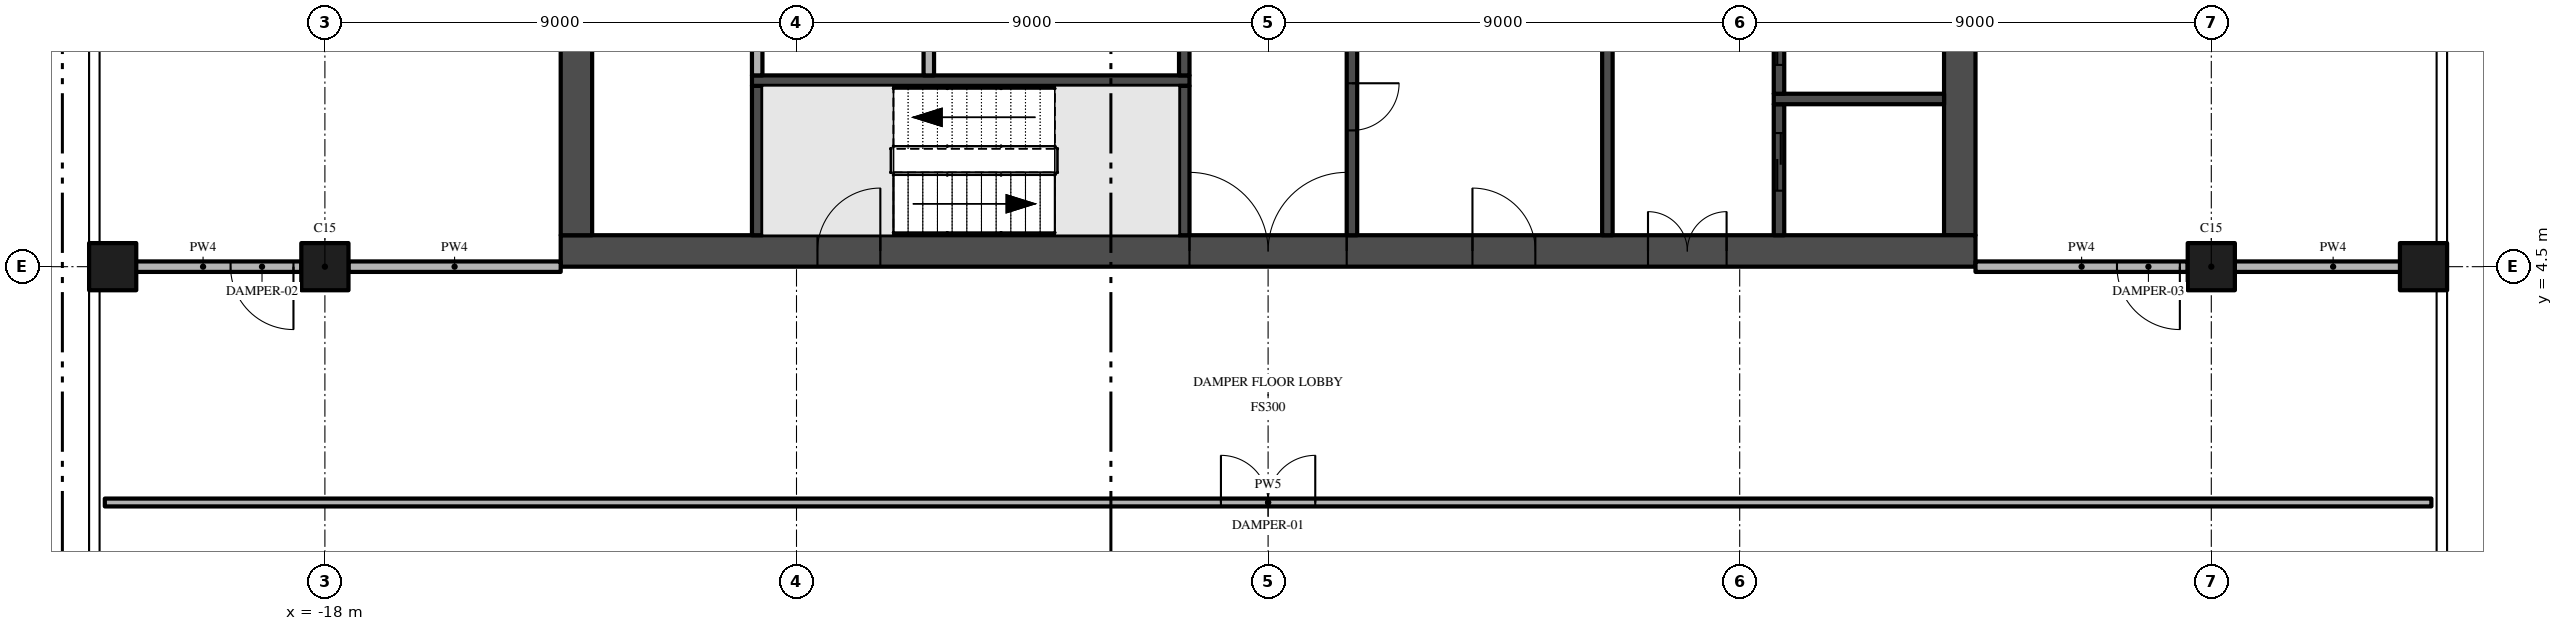
"""IFC4 building model, lengths in metres.
Left out: names, types, materials, properties, quantities, classifications, styles, units other than length and angle.
Written with IfcOpenShell. Run it as: python <this file> out.ifc"""

import sys

from ifc_helpers import new_model, si_unit, direction, frame, frame_2d, origin, origin_2d, place, context, subcontext, project, spatial, rectangle, extrude, element, fill, save


model = new_model("IFC4")
c1 = context("Model", 3, precision=1e-05, world=origin(), true_north=direction((0.0, 1.0)))
c2 = subcontext(c1, "Body", "Model", "MODEL_VIEW")
j1 = project(units=[si_unit("LENGTHUNIT", "METRE"), si_unit("PLANEANGLEUNIT", "RADIAN")], contexts=[c1])
p1 = place(None, origin())
s1 = spatial("IfcSite", under=j1, at=p1, CompositionType="ELEMENT")
p2 = place(p1, origin())
s2 = spatial("IfcBuilding", under=s1, at=p2, CompositionType="ELEMENT")
p3 = place(p2, frame((0.0, 0.0, 289.4)))
s3 = spatial("IfcBuildingStorey", under=s2, at=p3, CompositionType="ELEMENT", Elevation=289.4)
p4 = place(p3, frame((-13.5, 4.8, -0.3), z_axis=(0.0, 0.0, 1.0), x_axis=(1.0, 0.0, 0.0)))
e1 = element("IfcWall", 1, at=p4, inside=s3, PredefinedType="SHEAR", context=c2, shape_type="SweptSolid", body=[
    extrude(rectangle(XDim=27.0, YDim=0.6, at=frame_2d((13.5, 0.0))), origin(), (0.0, 0.0, 1.0), 8.0),
])
p5 = place(p4, frame((12.0, 0.0, 0.3)))
e2 = element("IfcOpeningElement", 2, at=p5, cuts=e1, PredefinedType="OPENING", context=c2, shape_type="SweptSolid", body=[
    extrude(rectangle(XDim=3.0, YDim=2.4, at=frame_2d((1.5, 1.2))), frame((0.0, 0.31, 0.0), z_axis=(0.0, -1.0, 0.0), x_axis=(1.0, 0.0, 0.0)), (0.0, 0.0, 1.0), 0.62),
])
p6 = place(p4, frame((4.9, 0.0, 0.3)))
e3 = element("IfcOpeningElement", 3, at=p6, cuts=e1, PredefinedType="OPENING", context=c2, shape_type="SweptSolid", body=[
    extrude(rectangle(XDim=1.2, YDim=2.2, at=frame_2d((0.6, 1.1))), frame((0.0, 0.31, 0.0), z_axis=(0.0, -1.0, 0.0), x_axis=(1.0, 0.0, 0.0)), (0.0, 0.0, 1.0), 0.62),
])
p7 = place(p4, frame((20.75, 0.0, 0.3)))
e4 = element("IfcOpeningElement", 4, at=p7, cuts=e1, PredefinedType="OPENING", context=c2, shape_type="SweptSolid", body=[
    extrude(rectangle(XDim=1.5, YDim=2.2, at=frame_2d((0.75, 1.1))), frame((0.0, 0.31, 0.0), z_axis=(0.0, -1.0, 0.0), x_axis=(1.0, 0.0, 0.0)), (0.0, 0.0, 1.0), 0.62),
])
p8 = place(p4, frame((17.4, 0.0, 0.3)))
e5 = element("IfcOpeningElement", 5, at=p8, cuts=e1, PredefinedType="OPENING", context=c2, shape_type="SweptSolid", body=[
    extrude(rectangle(XDim=1.2, YDim=2.2, at=frame_2d((0.6, 1.1))), frame((0.0, 0.31, 0.0), z_axis=(0.0, -1.0, 0.0), x_axis=(1.0, 0.0, 0.0)), (0.0, 0.0, 1.0), 0.62),
])
p9 = place(p3, frame((13.2, 5.1, -0.3), z_axis=(0.0, 0.0, 1.0), x_axis=(0.0, 1.0, 0.0)))
e6 = element("IfcWall", 6, at=p9, inside=s3, PredefinedType="SHEAR", context=c2, shape_type="SweptSolid", body=[
    extrude(rectangle(XDim=16.8, YDim=0.6, at=frame_2d((8.4, 0.0))), origin(), (0.0, 0.0, 1.0), 8.0),
])
p10 = place(p9, frame((6.3, 0.0, 0.3)))
e7 = element("IfcOpeningElement", 7, at=p10, cuts=e6, PredefinedType="OPENING", context=c2, shape_type="SweptSolid", body=[
    extrude(rectangle(XDim=1.2, YDim=2.2, at=frame_2d((0.6, 1.1))), frame((0.0, 0.31, 0.0), z_axis=(0.0, -1.0, 0.0), x_axis=(1.0, 0.0, 0.0)), (0.0, 0.0, 1.0), 0.62),
])
p11 = place(p3, frame((-13.2, 21.9, -0.3), z_axis=(0.0, 0.0, 1.0), x_axis=(0.0, -1.0, 0.0)))
e8 = element("IfcWall", 8, at=p11, inside=s3, PredefinedType="SHEAR", context=c2, shape_type="SweptSolid", body=[
    extrude(rectangle(XDim=16.8, YDim=0.6, at=frame_2d((8.4, 0.0))), origin(), (0.0, 0.0, 1.0), 8.0),
])
p12 = place(p11, frame((9.3, 0.0, 0.3)))
e9 = element("IfcOpeningElement", 9, at=p12, cuts=e8, PredefinedType="OPENING", context=c2, shape_type="SweptSolid", body=[
    extrude(rectangle(XDim=1.2, YDim=2.2, at=frame_2d((0.6, 1.1))), frame((0.0, 0.31, 0.0), z_axis=(0.0, -1.0, 0.0), x_axis=(1.0, 0.0, 0.0)), (0.0, 0.0, 1.0), 0.62),
])
p13 = place(p3, frame((-18.0, 4.5, 0.0), z_axis=(0.0, 0.0, 1.0), x_axis=(1.0, 0.0, 0.0)))
e10 = element("IfcColumn", 10, at=p13, inside=s3, PredefinedType="COLUMN", context=c2, shape_type="SweptSolid", body=[
    extrude(rectangle(XDim=0.9, YDim=0.9, at=origin_2d()), origin(), (0.0, 0.0, 1.0), 7.7),
])
p14 = place(p3, frame((-26.55, 4.5, 0.0), z_axis=(0.504568019295, 0.0, 0.863371944127), x_axis=(0.0, 1.0, 0.0)))
e11 = element("IfcColumn", 11, at=p14, inside=s3, PredefinedType="COLUMN", context=c2, shape_type="SweptSolid", body=[
    extrude(rectangle(XDim=0.9, YDim=0.9, at=origin_2d()), origin(), (0.0, 0.0, 1.0), 8.919),
])
p15 = place(p3, frame((18.0, 4.5, 0.0), z_axis=(0.0, 0.0, 1.0), x_axis=(1.0, 0.0, 0.0)))
e12 = element("IfcColumn", 12, at=p15, inside=s3, PredefinedType="COLUMN", context=c2, shape_type="SweptSolid", body=[
    extrude(rectangle(XDim=0.9, YDim=0.9, at=origin_2d()), origin(), (0.0, 0.0, 1.0), 7.7),
])
p16 = place(p3, frame((26.55, 4.5, 0.0), z_axis=(-0.504568019295, 0.0, 0.863371944127), x_axis=(0.0, -1.0, 0.0)))
e13 = element("IfcColumn", 13, at=p16, inside=s3, PredefinedType="COLUMN", context=c2, shape_type="SweptSolid", body=[
    extrude(rectangle(XDim=0.9, YDim=0.9, at=origin_2d()), origin(), (0.0, 0.0, 1.0), 8.919),
])
p17 = place(p3, frame((-9.75, 5.1, 0.0), z_axis=(0.0, 0.0, 1.0), x_axis=(0.0, 1.0, 0.0)))
e14 = element("IfcWall", 14, at=p17, inside=s3, PredefinedType="SHEAR", context=c2, shape_type="SweptSolid", body=[
    extrude(rectangle(XDim=2.85, YDim=0.2, at=frame_2d((1.425, 0.0))), origin(), (0.0, 0.0, 1.0), 7.7),
])
p18 = place(p3, frame((-9.85, 8.05, 0.0), z_axis=(0.0, 0.0, 1.0), x_axis=(1.0, 0.0, 0.0)))
e15 = element("IfcWall", 15, at=p18, inside=s3, PredefinedType="SHEAR", context=c2, shape_type="SweptSolid", body=[
    extrude(rectangle(XDim=8.35, YDim=0.2, at=frame_2d((4.175, 0.0))), origin(), (0.0, 0.0, 1.0), 7.7),
])
p19 = place(p3, frame((-9.75, 8.15, 0.0), z_axis=(0.0, 0.0, 1.0), x_axis=(0.0, 1.0, 0.0)))
e16 = element("IfcWall", 16, at=p19, inside=s3, PredefinedType="PARTITIONING", context=c2, shape_type="SweptSolid", body=[
    extrude(rectangle(XDim=1.85, YDim=0.2, at=frame_2d((0.925, 0.0))), origin(), (0.0, 0.0, 1.0), 7.7),
])
p20 = place(p19, frame((0.475, 0.0, 0.0)))
e17 = element("IfcOpeningElement", 17, at=p20, cuts=e16, PredefinedType="OPENING", context=c2, shape_type="SweptSolid", body=[
    extrude(rectangle(XDim=0.9, YDim=2.1, at=frame_2d((0.45, 1.05))), frame((0.0, 0.11, 0.0), z_axis=(0.0, -1.0, 0.0), x_axis=(1.0, 0.0, 0.0)), (0.0, 0.0, 1.0), 0.22),
])
p21 = place(p3, frame((-6.475, 8.15, 0.0), z_axis=(0.0, 0.0, 1.0), x_axis=(0.0, 1.0, 0.0)))
e18 = element("IfcWall", 18, at=p21, inside=s3, PredefinedType="PARTITIONING", context=c2, shape_type="SweptSolid", body=[
    extrude(rectangle(XDim=5.35, YDim=0.2, at=frame_2d((2.675, 0.0))), origin(), (0.0, 0.0, 1.0), 7.7),
])
p22 = place(p3, frame((-1.6, 5.1, 0.0), z_axis=(0.0, 0.0, 1.0), x_axis=(0.0, 1.0, 0.0)))
e19 = element("IfcWall", 19, at=p22, inside=s3, PredefinedType="SHEAR", context=c2, shape_type="SweptSolid", body=[
    extrude(rectangle(XDim=2.85, YDim=0.2, at=frame_2d((1.425, 0.0))), origin(), (0.0, 0.0, 1.0), 7.7),
])
p23 = place(p3, frame((-1.6, 8.15, 0.0), z_axis=(0.0, 0.0, 1.0), x_axis=(0.0, 1.0, 0.0)))
e20 = element("IfcWall", 20, at=p23, inside=s3, PredefinedType="SHEAR", context=c2, shape_type="SweptSolid", body=[
    extrude(rectangle(XDim=5.35, YDim=0.2, at=frame_2d((2.675, 0.0))), origin(), (0.0, 0.0, 1.0), 7.7),
])
p24 = place(p23, frame((2.225, 0.0, 0.0)))
e21 = element("IfcOpeningElement", 21, at=p24, cuts=e20, PredefinedType="OPENING", context=c2, shape_type="SweptSolid", body=[
    extrude(rectangle(XDim=0.9, YDim=2.1, at=frame_2d((0.45, 1.05))), frame((0.0, 0.11, 0.0), z_axis=(0.0, -1.0, 0.0), x_axis=(1.0, 0.0, 0.0)), (0.0, 0.0, 1.0), 0.22),
])
p25 = place(p3, frame((1.6, 9.2, 0.0), z_axis=(0.0, 0.0, 1.0), x_axis=(0.0, -1.0, 0.0)))
e22 = element("IfcWall", 22, at=p25, inside=s3, PredefinedType="SHEAR", context=c2, shape_type="SweptSolid", body=[
    extrude(rectangle(XDim=4.1, YDim=0.2, at=frame_2d((2.05, 0.0))), origin(), (0.0, 0.0, 1.0), 7.7),
])
p26 = place(p25, frame((1.2, 0.0, 0.0)))
e23 = element("IfcOpeningElement", 23, at=p26, cuts=e22, PredefinedType="OPENING", context=c2, shape_type="SweptSolid", body=[
    extrude(rectangle(XDim=0.9, YDim=2.1, at=frame_2d((0.45, 1.05))), frame((0.0, 0.11, 0.0), z_axis=(0.0, -1.0, 0.0), x_axis=(1.0, 0.0, 0.0)), (0.0, 0.0, 1.0), 0.22),
])
p27 = place(p3, frame((6.475, 5.1, 0.0), z_axis=(0.0, 0.0, 1.0), x_axis=(0.0, 1.0, 0.0)))
e24 = element("IfcWall", 24, at=p27, inside=s3, PredefinedType="SHEAR", context=c2, shape_type="SweptSolid", body=[
    extrude(rectangle(XDim=4.1, YDim=0.2, at=frame_2d((2.05, 0.0))), origin(), (0.0, 0.0, 1.0), 7.7),
])
p28 = place(p3, frame((9.75, 5.1, 0.0), z_axis=(0.0, 0.0, 1.0), x_axis=(0.0, 1.0, 0.0)))
e25 = element("IfcWall", 25, at=p28, inside=s3, PredefinedType="SHEAR", context=c2, shape_type="SweptSolid", body=[
    extrude(rectangle(XDim=2.5, YDim=0.2, at=frame_2d((1.25, 0.0))), origin(), (0.0, 0.0, 1.0), 7.7),
])
p29 = place(p28, frame((0.85, 0.0, 0.0)))
e26 = element("IfcOpeningElement", 26, at=p29, cuts=e25, PredefinedType="OPENING", context=c2, shape_type="SweptSolid", body=[
    extrude(rectangle(XDim=1.1, YDim=2.1, at=frame_2d((0.55, 1.05))), frame((0.0, 0.11, 0.0), z_axis=(0.0, -1.0, 0.0), x_axis=(1.0, 0.0, 0.0)), (0.0, 0.0, 1.0), 0.22),
])
p30 = place(p3, frame((9.65, 7.7, 0.0), z_axis=(0.0, 0.0, 1.0), x_axis=(1.0, 0.0, 0.0)))
e27 = element("IfcWall", 27, at=p30, inside=s3, PredefinedType="SHEAR", context=c2, shape_type="SweptSolid", body=[
    extrude(rectangle(XDim=3.25, YDim=0.2, at=frame_2d((1.625, 0.0))), origin(), (0.0, 0.0, 1.0), 7.7),
])
p31 = place(p3, frame((9.75, 7.8, 0.0), z_axis=(0.0, 0.0, 1.0), x_axis=(0.0, 1.0, 0.0)))
e28 = element("IfcWall", 28, at=p31, inside=s3, PredefinedType="SHEAR", context=c2, shape_type="SweptSolid", body=[
    extrude(rectangle(XDim=2.2, YDim=0.2, at=frame_2d((1.1, 0.0))), origin(), (0.0, 0.0, 1.0), 7.7),
])
p32 = place(p31, frame((0.55, 0.0, 0.0)))
e29 = element("IfcOpeningElement", 29, at=p32, cuts=e28, PredefinedType="OPENING", context=c2, shape_type="SweptSolid", body=[
    extrude(rectangle(XDim=1.1, YDim=2.1, at=frame_2d((0.55, 1.05))), frame((0.0, 0.11, 0.0), z_axis=(0.0, -1.0, 0.0), x_axis=(1.0, 0.0, 0.0)), (0.0, 0.0, 1.0), 0.22),
])
p33 = place(p3, frame((-22.2, 0.0, 0.0), z_axis=(0.0, 0.0, 1.0), x_axis=(1.0, 0.0, 0.0)))
e30 = element("IfcWall", 30, at=p33, inside=s3, PredefinedType="PARTITIONING", context=c2, shape_type="SweptSolid", body=[
    extrude(rectangle(XDim=44.4, YDim=0.15, at=frame_2d((22.2, 0.0))), origin(), (0.0, 0.0, 1.0), 7.7),
])
p34 = place(p33, frame((21.3, 0.0, 0.0)))
e31 = element("IfcOpeningElement", 31, at=p34, cuts=e30, PredefinedType="OPENING", context=c2, shape_type="SweptSolid", body=[
    extrude(rectangle(XDim=1.8, YDim=2.4, at=frame_2d((0.9, 1.2))), frame((0.0, 0.085, 0.0), z_axis=(0.0, -1.0, 0.0), x_axis=(1.0, 0.0, 0.0)), (0.0, 0.0, 1.0), 0.17),
])
p35 = place(p3, frame((-18.45, 4.5, 0.0), z_axis=(0.0, 0.0, 1.0), x_axis=(-1.0, 0.0, 0.0)))
e32 = element("IfcWall", 32, at=p35, inside=s3, PredefinedType="PARTITIONING", context=c2, shape_type="SweptSolid", body=[
    extrude(rectangle(XDim=3.75, YDim=0.2, at=frame_2d((1.875, 0.0))), origin(), (0.0, 0.0, 1.0), 7.7),
])
p36 = place(p35, frame((0.15, 0.0, 0.0)))
e33 = element("IfcOpeningElement", 33, at=p36, cuts=e32, PredefinedType="OPENING", context=c2, shape_type="SweptSolid", body=[
    extrude(rectangle(XDim=1.2, YDim=2.4, at=frame_2d((0.6, 1.2))), frame((0.0, 0.11, 0.0), z_axis=(0.0, -1.0, 0.0), x_axis=(1.0, 0.0, 0.0)), (0.0, 0.0, 1.0), 0.22),
])
p37 = place(p3, frame((-17.55, 4.5, 0.0), z_axis=(0.0, 0.0, 1.0), x_axis=(1.0, 0.0, 0.0)))
e34 = element("IfcWall", 34, at=p37, inside=s3, PredefinedType="PARTITIONING", context=c2, shape_type="SweptSolid", body=[
    extrude(rectangle(XDim=4.05, YDim=0.2, at=frame_2d((2.025, 0.0))), origin(), (0.0, 0.0, 1.0), 7.7),
])
p38 = place(p3, frame((17.55, 4.5, 0.0), z_axis=(0.0, 0.0, 1.0), x_axis=(-1.0, 0.0, 0.0)))
e35 = element("IfcWall", 35, at=p38, inside=s3, PredefinedType="PARTITIONING", context=c2, shape_type="SweptSolid", body=[
    extrude(rectangle(XDim=4.05, YDim=0.2, at=frame_2d((2.025, 0.0))), origin(), (0.0, 0.0, 1.0), 7.7),
])
p39 = place(p38, frame((0.15, 0.0, 0.0)))
e36 = element("IfcOpeningElement", 36, at=p39, cuts=e35, PredefinedType="OPENING", context=c2, shape_type="SweptSolid", body=[
    extrude(rectangle(XDim=1.2, YDim=2.4, at=frame_2d((0.6, 1.2))), frame((0.0, 0.11, 0.0), z_axis=(0.0, -1.0, 0.0), x_axis=(1.0, 0.0, 0.0)), (0.0, 0.0, 1.0), 0.22),
])
p40 = place(p3, frame((18.45, 4.5, 0.0), z_axis=(0.0, 0.0, 1.0), x_axis=(1.0, 0.0, 0.0)))
e37 = element("IfcWall", 37, at=p40, inside=s3, PredefinedType="PARTITIONING", context=c2, shape_type="SweptSolid", body=[
    extrude(rectangle(XDim=3.75, YDim=0.2, at=frame_2d((1.875, 0.0))), origin(), (0.0, 0.0, 1.0), 7.7),
])
p41 = place(p5, frame((3.0, 0.0, 0.0), z_axis=(0.0, 0.0, 1.0), x_axis=(-1.0, 0.0, 0.0)))
e38 = element("IfcDoor", 38, at=p41, inside=s3, OperationType="DOUBLE_DOOR_SINGLE_SWING", PredefinedType="DOOR", context=c2, shape_type="SweptSolid", body=[
    extrude(rectangle(XDim=3.0, YDim=2.4, at=frame_2d((1.5, 1.2))), frame((0.0, 0.025, 0.0), z_axis=(0.0, -1.0, 0.0), x_axis=(1.0, 0.0, 0.0)), (0.0, 0.0, 1.0), 0.05),
])
fill(e2, e38)
p42 = place(p6, frame((1.2, 0.0, 0.0), z_axis=(0.0, 0.0, 1.0), x_axis=(-1.0, 0.0, 0.0)))
e39 = element("IfcDoor", 39, at=p42, inside=s3, OperationType="SINGLE_SWING_LEFT", PredefinedType="DOOR", context=c2, shape_type="SweptSolid", body=[
    extrude(rectangle(XDim=1.2, YDim=2.2, at=frame_2d((0.6, 1.1))), frame((0.0, 0.025, 0.0), z_axis=(0.0, -1.0, 0.0), x_axis=(1.0, 0.0, 0.0)), (0.0, 0.0, 1.0), 0.05),
])
fill(e3, e39)
p43 = place(p7, frame((1.5, 0.0, 0.0), z_axis=(0.0, 0.0, 1.0), x_axis=(-1.0, 0.0, 0.0)))
e40 = element("IfcDoor", 40, at=p43, inside=s3, OperationType="DOUBLE_DOOR_SINGLE_SWING", PredefinedType="DOOR", context=c2, shape_type="SweptSolid", body=[
    extrude(rectangle(XDim=1.5, YDim=2.2, at=frame_2d((0.75, 1.1))), frame((0.0, 0.025, 0.0), z_axis=(0.0, -1.0, 0.0), x_axis=(1.0, 0.0, 0.0)), (0.0, 0.0, 1.0), 0.05),
])
fill(e4, e40)
p44 = place(p8, frame((1.2, 0.0, 0.0), z_axis=(0.0, 0.0, 1.0), x_axis=(-1.0, 0.0, 0.0)))
e41 = element("IfcDoor", 41, at=p44, inside=s3, OperationType="SINGLE_SWING_RIGHT", PredefinedType="DOOR", context=c2, shape_type="SweptSolid", body=[
    extrude(rectangle(XDim=1.2, YDim=2.2, at=frame_2d((0.6, 1.1))), frame((0.0, 0.025, 0.0), z_axis=(0.0, -1.0, 0.0), x_axis=(1.0, 0.0, 0.0)), (0.0, 0.0, 1.0), 0.05),
])
fill(e5, e41)
p45 = place(p29, origin())
e42 = element("IfcDoor", 42, at=p45, inside=s3, OperationType="SLIDING_TO_RIGHT", PredefinedType="DOOR", context=c2, shape_type="SweptSolid", body=[
    extrude(rectangle(XDim=1.1, YDim=2.1, at=frame_2d((0.55, 1.05))), frame((0.0, 0.025, 0.0), z_axis=(0.0, -1.0, 0.0), x_axis=(1.0, 0.0, 0.0)), (0.0, 0.0, 1.0), 0.05),
])
fill(e26, e42)
p46 = place(p32, origin())
e43 = element("IfcDoor", 43, at=p46, inside=s3, OperationType="SLIDING_TO_RIGHT", PredefinedType="DOOR", context=c2, shape_type="SweptSolid", body=[
    extrude(rectangle(XDim=1.1, YDim=2.1, at=frame_2d((0.55, 1.05))), frame((0.0, 0.025, 0.0), z_axis=(0.0, -1.0, 0.0), x_axis=(1.0, 0.0, 0.0)), (0.0, 0.0, 1.0), 0.05),
])
fill(e29, e43)
p47 = place(p26, origin())
e44 = element("IfcDoor", 44, at=p47, inside=s3, OperationType="SINGLE_SWING_LEFT", PredefinedType="DOOR", context=c2, shape_type="SweptSolid", body=[
    extrude(rectangle(XDim=0.9, YDim=2.1, at=frame_2d((0.45, 1.05))), frame((0.0, 0.025, 0.0), z_axis=(0.0, -1.0, 0.0), x_axis=(1.0, 0.0, 0.0)), (0.0, 0.0, 1.0), 0.05),
])
fill(e23, e44)
p48 = place(p34, origin())
e45 = element("IfcDoor", 45, at=p48, inside=s3, OperationType="DOUBLE_DOOR_SINGLE_SWING", PredefinedType="DOOR", context=c2, shape_type="SweptSolid", body=[
    extrude(rectangle(XDim=1.8, YDim=2.4, at=frame_2d((0.9, 1.2))), frame((0.0, 0.025, 0.0), z_axis=(0.0, -1.0, 0.0), x_axis=(1.0, 0.0, 0.0)), (0.0, 0.0, 1.0), 0.05),
])
fill(e31, e45)
p49 = place(p36, origin())
e46 = element("IfcDoor", 46, at=p49, inside=s3, OperationType="SINGLE_SWING_LEFT", PredefinedType="DOOR", context=c2, shape_type="SweptSolid", body=[
    extrude(rectangle(XDim=1.2, YDim=2.4, at=frame_2d((0.6, 1.2))), frame((0.0, 0.025, 0.0), z_axis=(0.0, -1.0, 0.0), x_axis=(1.0, 0.0, 0.0)), (0.0, 0.0, 1.0), 0.05),
])
fill(e33, e46)
p50 = place(p39, origin())
e47 = element("IfcDoor", 47, at=p50, inside=s3, OperationType="SINGLE_SWING_LEFT", PredefinedType="DOOR", context=c2, shape_type="SweptSolid", body=[
    extrude(rectangle(XDim=1.2, YDim=2.4, at=frame_2d((0.6, 1.2))), frame((0.0, 0.025, 0.0), z_axis=(0.0, -1.0, 0.0), x_axis=(1.0, 0.0, 0.0)), (0.0, 0.0, 1.0), 0.05),
])
fill(e36, e47)
save(model, sys.argv[1])
